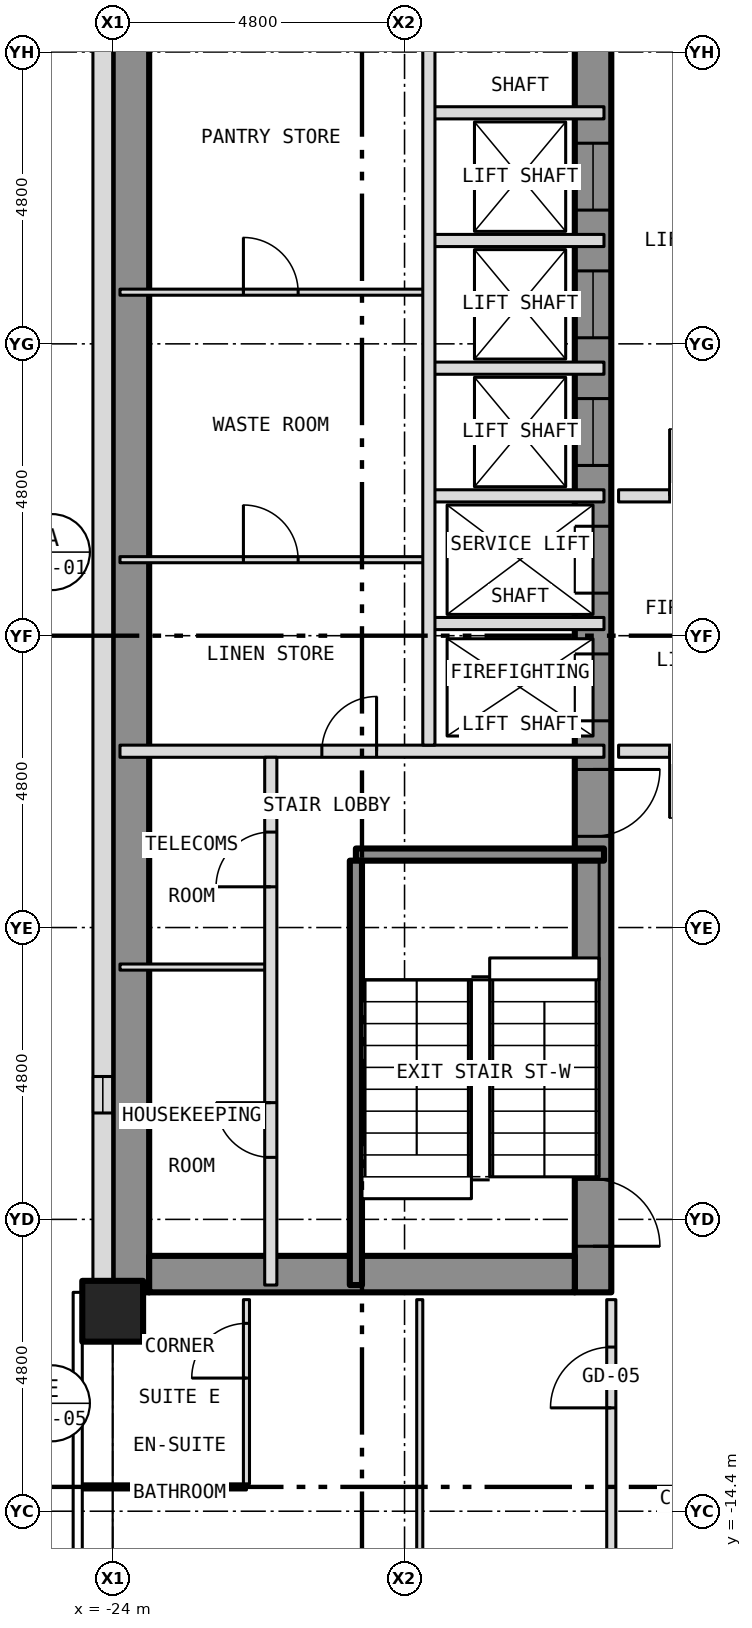
"""IFC4 building model, lengths in metres.
Left out: names, types, materials, properties, quantities, classifications, styles, units other than length and angle.
Written with IfcOpenShell. Run it as: python <this file> out.ifc"""

import sys

from ifc_helpers import new_model, si_unit, direction, frame, frame_2d, origin, origin_2d, place, context, subcontext, project, spatial, rectangle, hollow_rectangle, extrude, element, fill, save


model = new_model("IFC4")
c1 = context("Model", 3, precision=1e-05, world=origin(), true_north=direction((0.0, 1.0)))
c2 = subcontext(c1, "Body", "Model", "MODEL_VIEW")
j1 = project(units=[si_unit("LENGTHUNIT", "METRE"), si_unit("PLANEANGLEUNIT", "RADIAN")], contexts=[c1])
p1 = place(None, origin())
s1 = spatial("IfcSite", under=j1, at=p1, CompositionType="ELEMENT")
p2 = place(p1, origin())
s2 = spatial("IfcBuilding", under=s1, at=p2, CompositionType="ELEMENT")
p3 = place(p2, frame((0.0, 0.0, 70.5)))
s3 = spatial("IfcBuildingStorey", under=s2, at=p3, CompositionType="ELEMENT", Elevation=70.5)
p4 = place(p3, frame((-24.0, -11.111, -0.15), z_axis=(0.0, 0.0, 1.0), x_axis=(1.0, 0.0, 0.0)))
e1 = element("IfcColumn", 1, at=p4, inside=s3, PredefinedType="COLUMN", context=c2, shape_type="SweptSolid", body=[
    extrude(hollow_rectangle(XDim=1.0, YDim=1.0, WallThickness=0.06, at=origin_2d()), origin(), (0.0, 0.0, 1.0), 3.5),
])
p5 = place(p3, frame((-16.1, -10.8, 0.0), z_axis=(0.0, 0.0, 1.0), x_axis=(0.0, 1.0, 0.0)))
e2 = element("IfcWall", 2, at=p5, inside=s3, PredefinedType="SHEAR", context=c2, shape_type="SweptSolid", body=[
    extrude(rectangle(XDim=21.6, YDim=0.6, at=frame_2d((10.8, 0.0))), origin(), (0.0, 0.0, 1.0), 3.25),
])
p6 = place(p5, frame((9.4, 0.0, 0.0)))
e3 = element("IfcOpeningElement", 3, at=p6, cuts=e2, PredefinedType="OPENING", context=c2, shape_type="SweptSolid", body=[
    extrude(rectangle(XDim=1.1, YDim=2.1, at=frame_2d((0.55, 1.05))), frame((0.0, 0.312, 0.0), z_axis=(0.0, -1.0, 0.0), x_axis=(1.0, 0.0, 0.0)), (0.0, 0.0, 1.0), 0.624),
])
p7 = place(p5, frame((11.5, 0.0, 0.0)))
e4 = element("IfcOpeningElement", 4, at=p7, cuts=e2, PredefinedType="OPENING", context=c2, shape_type="SweptSolid", body=[
    extrude(rectangle(XDim=1.1, YDim=2.1, at=frame_2d((0.55, 1.05))), frame((0.0, 0.312, 0.0), z_axis=(0.0, -1.0, 0.0), x_axis=(1.0, 0.0, 0.0)), (0.0, 0.0, 1.0), 0.624),
])
p8 = place(p5, frame((13.6, 0.0, 0.0)))
e5 = element("IfcOpeningElement", 5, at=p8, cuts=e2, PredefinedType="OPENING", context=c2, shape_type="SweptSolid", body=[
    extrude(rectangle(XDim=1.1, YDim=2.1, at=frame_2d((0.55, 1.05))), frame((0.0, 0.312, 0.0), z_axis=(0.0, -1.0, 0.0), x_axis=(1.0, 0.0, 0.0)), (0.0, 0.0, 1.0), 0.624),
])
p9 = place(p5, frame((15.7, 0.0, 0.0)))
e6 = element("IfcOpeningElement", 6, at=p9, cuts=e2, PredefinedType="OPENING", context=c2, shape_type="SweptSolid", body=[
    extrude(rectangle(XDim=1.1, YDim=2.1, at=frame_2d((0.55, 1.05))), frame((0.0, 0.312, 0.0), z_axis=(0.0, -1.0, 0.0), x_axis=(1.0, 0.0, 0.0)), (0.0, 0.0, 1.0), 0.624),
])
p10 = place(p5, frame((17.8, 0.0, 0.0)))
e7 = element("IfcOpeningElement", 7, at=p10, cuts=e2, PredefinedType="OPENING", context=c2, shape_type="SweptSolid", body=[
    extrude(rectangle(XDim=1.1, YDim=2.1, at=frame_2d((0.55, 1.05))), frame((0.0, 0.312, 0.0), z_axis=(0.0, -1.0, 0.0), x_axis=(1.0, 0.0, 0.0)), (0.0, 0.0, 1.0), 0.624),
])
p11 = place(p5, frame((0.758, 0.0, 0.0)))
e8 = element("IfcOpeningElement", 8, at=p11, cuts=e2, PredefinedType="OPENING", context=c2, shape_type="SweptSolid", body=[
    extrude(rectangle(XDim=1.1, YDim=2.1, at=frame_2d((0.55, 1.05))), frame((0.0, 0.312, 0.0), z_axis=(0.0, -1.0, 0.0), x_axis=(1.0, 0.0, 0.0)), (0.0, 0.0, 1.0), 0.624),
])
p12 = place(p5, frame((7.5, 0.0, 0.0)))
e9 = element("IfcOpeningElement", 9, at=p12, cuts=e2, PredefinedType="OPENING", context=c2, shape_type="SweptSolid", body=[
    extrude(rectangle(XDim=1.1, YDim=2.1, at=frame_2d((0.55, 1.05))), frame((0.0, 0.312, 0.0), z_axis=(0.0, -1.0, 0.0), x_axis=(1.0, 0.0, 0.0)), (0.0, 0.0, 1.0), 0.624),
])
p13 = place(p3, frame((-23.7, -10.8, 0.0), z_axis=(0.0, 0.0, 1.0), x_axis=(0.0, 1.0, 0.0)))
e10 = element("IfcWall", 10, at=p13, inside=s3, PredefinedType="SHEAR", context=c2, shape_type="SweptSolid", body=[
    extrude(rectangle(XDim=21.6, YDim=0.6, at=frame_2d((10.8, 0.0))), origin(), (0.0, 0.0, 1.0), 3.25),
])
p14 = place(p3, frame((-23.4, -10.5, 0.0), z_axis=(0.0, 0.0, 1.0), x_axis=(1.0, 0.0, 0.0)))
e11 = element("IfcWall", 11, at=p14, inside=s3, PredefinedType="SHEAR", context=c2, shape_type="SweptSolid", body=[
    extrude(rectangle(XDim=7.0, YDim=0.6, at=frame_2d((3.5, 0.0))), origin(), (0.0, 0.0, 1.0), 3.25),
])
p15 = place(p3, frame((-24.163, 10.8, 0.0), z_axis=(0.0, 0.0, 1.0), x_axis=(0.0, -1.0, 0.0)))
e12 = element("IfcWall", 12, at=p15, inside=s3, PredefinedType="SOLIDWALL", context=c2, shape_type="SweptSolid", body=[
    extrude(rectangle(XDim=21.6, YDim=0.325, at=frame_2d((10.8, 0.0))), origin(), (0.0, 0.0, 1.0), 3.5),
])
p16 = place(p15, frame((18.05, 0.0, 1.0)))
e13 = element("IfcOpeningElement", 13, at=p16, cuts=e12, PredefinedType="OPENING", context=c2, shape_type="SweptSolid", body=[
    extrude(rectangle(XDim=0.6, YDim=1.5, at=frame_2d((0.3, 0.75))), frame((0.0, 0.175, 0.0), z_axis=(0.0, -1.0, 0.0), x_axis=(1.0, 0.0, 0.0)), (0.0, 0.0, 1.0), 0.349),
])
p17 = place(p3, frame((-24.53, -14.0, 0.0), z_axis=(0.0, 0.0, 1.0), x_axis=(1.0, 0.0, 0.0)))
e14 = element("IfcWall", 14, at=p17, inside=s3, PredefinedType="PARTITIONING", context=c2, shape_type="SweptSolid", body=[
    extrude(rectangle(XDim=2.73, YDim=0.1, at=frame_2d((1.365, 0.0))), origin(), (0.0, 0.0, 1.0), 3.35),
])
p18 = place(p3, frame((-23.88, -5.45, 0.0), z_axis=(0.0, 0.0, 1.0), x_axis=(1.0, 0.0, 0.0)))
e15 = element("IfcWall", 15, at=p18, inside=s3, PredefinedType="PARTITIONING", context=c2, shape_type="SweptSolid", body=[
    extrude(rectangle(XDim=2.48, YDim=0.1, at=frame_2d((1.24, 0.0))), origin(), (0.0, 0.0, 1.0), 3.25),
])
p19 = place(p3, frame((-20.0, -3.6, 0.0), z_axis=(0.0, 0.0, 1.0), x_axis=(1.0, 0.0, 0.0)))
e16 = element("IfcWall", 16, at=p19, inside=s3, PredefinedType="SHEAR", context=c2, shape_type="SweptSolid", body=[
    extrude(rectangle(XDim=4.08, YDim=0.2, at=frame_2d((2.04, 0.0))), origin(), (0.0, 0.0, 1.0), 3.25),
])
p20 = place(p3, frame((-23.88, -1.9, 0.0), z_axis=(0.0, 0.0, 1.0), x_axis=(1.0, 0.0, 0.0)))
e17 = element("IfcWall", 17, at=p20, inside=s3, PredefinedType="PARTITIONING", context=c2, shape_type="SweptSolid", body=[
    extrude(rectangle(XDim=7.96, YDim=0.2, at=frame_2d((3.98, 0.0))), origin(), (0.0, 0.0, 1.0), 3.25),
])
p21 = place(p20, frame((3.32, 0.0, 0.0)))
e18 = element("IfcOpeningElement", 18, at=p21, cuts=e17, PredefinedType="OPENING", context=c2, shape_type="SweptSolid", body=[
    extrude(rectangle(XDim=0.9, YDim=2.1, at=frame_2d((0.45, 1.05))), frame((0.0, 0.112, 0.0), z_axis=(0.0, -1.0, 0.0), x_axis=(1.0, 0.0, 0.0)), (0.0, 0.0, 1.0), 0.224),
])
p22 = place(p3, frame((-15.68, -1.9, 0.0), z_axis=(0.0, 0.0, 1.0), x_axis=(1.0, 0.0, 0.0)))
e19 = element("IfcWall", 19, at=p22, inside=s3, PredefinedType="PARTITIONING", context=c2, shape_type="SweptSolid", body=[
    extrude(rectangle(XDim=3.28, YDim=0.2, at=frame_2d((1.64, 0.0))), origin(), (0.0, 0.0, 1.0), 3.35),
])
p23 = place(p22, frame((0.84, 0.0, 0.0)))
e20 = element("IfcOpeningElement", 20, at=p23, cuts=e19, PredefinedType="OPENING", context=c2, shape_type="SweptSolid", body=[
    extrude(rectangle(XDim=1.1, YDim=2.1, at=frame_2d((0.55, 1.05))), frame((0.0, 0.112, 0.0), z_axis=(0.0, -1.0, 0.0), x_axis=(1.0, 0.0, 0.0)), (0.0, 0.0, 1.0), 0.224),
])
p24 = place(p3, frame((-18.8, 0.2, 0.0), z_axis=(0.0, 0.0, 1.0), x_axis=(1.0, 0.0, 0.0)))
e21 = element("IfcWall", 21, at=p24, inside=s3, PredefinedType="PARTITIONING", context=c2, shape_type="SweptSolid", body=[
    extrude(rectangle(XDim=2.88, YDim=0.2, at=frame_2d((1.44, 0.0))), origin(), (0.0, 0.0, 1.0), 3.25),
])
p25 = place(p3, frame((-23.88, 1.25, 0.0), z_axis=(0.0, 0.0, 1.0), x_axis=(1.0, 0.0, 0.0)))
e22 = element("IfcWall", 22, at=p25, inside=s3, PredefinedType="PARTITIONING", context=c2, shape_type="SweptSolid", body=[
    extrude(rectangle(XDim=5.08, YDim=0.1, at=frame_2d((2.54, 0.0))), origin(), (0.0, 0.0, 1.0), 3.25),
])
p26 = place(p25, frame((2.03, 0.0, 0.0)))
e23 = element("IfcOpeningElement", 23, at=p26, cuts=e22, PredefinedType="OPENING", context=c2, shape_type="SweptSolid", body=[
    extrude(rectangle(XDim=0.9, YDim=2.1, at=frame_2d((0.45, 1.05))), frame((0.0, 0.062, 0.0), z_axis=(0.0, -1.0, 0.0), x_axis=(1.0, 0.0, 0.0)), (0.0, 0.0, 1.0), 0.124),
])
p27 = place(p3, frame((-18.8, 2.3, 0.0), z_axis=(0.0, 0.0, 1.0), x_axis=(1.0, 0.0, 0.0)))
e24 = element("IfcWall", 24, at=p27, inside=s3, PredefinedType="PARTITIONING", context=c2, shape_type="SweptSolid", body=[
    extrude(rectangle(XDim=2.88, YDim=0.2, at=frame_2d((1.44, 0.0))), origin(), (0.0, 0.0, 1.0), 3.25),
])
p28 = place(p3, frame((-15.68, 2.3, 0.0), z_axis=(0.0, 0.0, 1.0), x_axis=(1.0, 0.0, 0.0)))
e25 = element("IfcWall", 25, at=p28, inside=s3, PredefinedType="PARTITIONING", context=c2, shape_type="SweptSolid", body=[
    extrude(rectangle(XDim=3.28, YDim=0.2, at=frame_2d((1.64, 0.0))), origin(), (0.0, 0.0, 1.0), 3.35),
])
p29 = place(p28, frame((0.84, 0.0, 0.0)))
e26 = element("IfcOpeningElement", 26, at=p29, cuts=e25, PredefinedType="OPENING", context=c2, shape_type="SweptSolid", body=[
    extrude(rectangle(XDim=1.1, YDim=2.1, at=frame_2d((0.55, 1.05))), frame((0.0, 0.112, 0.0), z_axis=(0.0, -1.0, 0.0), x_axis=(1.0, 0.0, 0.0)), (0.0, 0.0, 1.0), 0.224),
])
p30 = place(p3, frame((-18.8, 4.4, 0.0), z_axis=(0.0, 0.0, 1.0), x_axis=(1.0, 0.0, 0.0)))
e27 = element("IfcWall", 27, at=p30, inside=s3, PredefinedType="PARTITIONING", context=c2, shape_type="SweptSolid", body=[
    extrude(rectangle(XDim=2.88, YDim=0.2, at=frame_2d((1.44, 0.0))), origin(), (0.0, 0.0, 1.0), 3.25),
])
p31 = place(p3, frame((-23.88, 5.65, 0.0), z_axis=(0.0, 0.0, 1.0), x_axis=(1.0, 0.0, 0.0)))
e28 = element("IfcWall", 28, at=p31, inside=s3, PredefinedType="PARTITIONING", context=c2, shape_type="SweptSolid", body=[
    extrude(rectangle(XDim=5.08, YDim=0.1, at=frame_2d((2.54, 0.0))), origin(), (0.0, 0.0, 1.0), 3.25),
])
p32 = place(p31, frame((2.03, 0.0, 0.0)))
e29 = element("IfcOpeningElement", 29, at=p32, cuts=e28, PredefinedType="OPENING", context=c2, shape_type="SweptSolid", body=[
    extrude(rectangle(XDim=0.9, YDim=2.1, at=frame_2d((0.45, 1.05))), frame((0.0, 0.062, 0.0), z_axis=(0.0, -1.0, 0.0), x_axis=(1.0, 0.0, 0.0)), (0.0, 0.0, 1.0), 0.124),
])
for number, where, z_axis, x_axis in (
    (30, (-18.8, 6.5, 0.0), (0.0, 0.0, 1.0), (1.0, 0.0, 0.0)),
    (31, (-18.8, 8.6, 0.0), (0.0, 0.0, 1.0), (1.0, 0.0, 0.0)),
):
    element("IfcWall", number, at=place(p3, frame(where, z_axis=z_axis, x_axis=x_axis)), inside=s3, PredefinedType="PARTITIONING", context=c2, shape_type="SweptSolid", body=[
        extrude(rectangle(XDim=2.88, YDim=0.2, at=frame_2d((1.44, 0.0))), origin(), (0.0, 0.0, 1.0), 3.25),
    ])
p33 = place(p3, frame((-21.8, -13.95, 0.0), z_axis=(0.0, 0.0, 1.0), x_axis=(0.0, 1.0, 0.0)))
e32 = element("IfcWall", 32, at=p33, inside=s3, PredefinedType="PARTITIONING", context=c2, shape_type="SweptSolid", body=[
    extrude(rectangle(XDim=3.03, YDim=0.1, at=frame_2d((1.515, 0.0))), origin(), (0.0, 0.0, 1.0), 3.35),
])
p34 = place(p33, frame((1.74, 0.0, 0.0)))
e33 = element("IfcOpeningElement", 33, at=p34, cuts=e32, PredefinedType="OPENING", context=c2, shape_type="SweptSolid", body=[
    extrude(rectangle(XDim=0.9, YDim=2.1, at=frame_2d((0.45, 1.05))), frame((0.0, 0.062, 0.0), z_axis=(0.0, -1.0, 0.0), x_axis=(1.0, 0.0, 0.0)), (0.0, 0.0, 1.0), 0.124),
])
p35 = place(p3, frame((-21.4, -10.68, 0.0), z_axis=(0.0, 0.0, 1.0), x_axis=(0.0, 1.0, 0.0)))
e34 = element("IfcWall", 34, at=p35, inside=s3, PredefinedType="PARTITIONING", context=c2, shape_type="SweptSolid", body=[
    extrude(rectangle(XDim=8.68, YDim=0.2, at=frame_2d((4.34, 0.0))), origin(), (0.0, 0.0, 1.0), 3.25),
])
p36 = place(p35, frame((2.1, 0.0, 0.0)))
e35 = element("IfcOpeningElement", 35, at=p36, cuts=e34, PredefinedType="OPENING", context=c2, shape_type="SweptSolid", body=[
    extrude(rectangle(XDim=0.9, YDim=2.1, at=frame_2d((0.45, 1.05))), frame((0.0, 0.112, 0.0), z_axis=(0.0, -1.0, 0.0), x_axis=(1.0, 0.0, 0.0)), (0.0, 0.0, 1.0), 0.224),
])
p37 = place(p35, frame((6.55, 0.0, 0.0)))
e36 = element("IfcOpeningElement", 36, at=p37, cuts=e34, PredefinedType="OPENING", context=c2, shape_type="SweptSolid", body=[
    extrude(rectangle(XDim=0.9, YDim=2.1, at=frame_2d((0.45, 1.05))), frame((0.0, 0.112, 0.0), z_axis=(0.0, -1.0, 0.0), x_axis=(1.0, 0.0, 0.0)), (0.0, 0.0, 1.0), 0.224),
])
p38 = place(p3, frame((-20.0, -10.68, 0.0), z_axis=(0.0, 0.0, 1.0), x_axis=(0.0, 1.0, 0.0)))
e37 = element("IfcWall", 37, at=p38, inside=s3, PredefinedType="SHEAR", context=c2, shape_type="SweptSolid", body=[
    extrude(rectangle(XDim=6.98, YDim=0.2, at=frame_2d((3.49, 0.0))), origin(), (0.0, 0.0, 1.0), 3.25),
])
p39 = place(p3, frame((-18.95, -24.53, 0.0), z_axis=(0.0, 0.0, 1.0), x_axis=(0.0, 1.0, 0.0)))
e38 = element("IfcWall", 38, at=p39, inside=s3, PredefinedType="PARTITIONING", context=c2, shape_type="SweptSolid", body=[
    extrude(rectangle(XDim=13.61, YDim=0.1, at=frame_2d((6.805, 0.0))), origin(), (0.0, 0.0, 1.0), 3.35),
])
p40 = place(p39, frame((6.68, 0.0, 0.0)))
e39 = element("IfcOpeningElement", 39, at=p40, cuts=e38, PredefinedType="OPENING", context=c2, shape_type="SweptSolid", body=[
    extrude(rectangle(XDim=0.9, YDim=2.1, at=frame_2d((0.45, 1.05))), frame((0.0, 0.062, 0.0), z_axis=(0.0, -1.0, 0.0), x_axis=(1.0, 0.0, 0.0)), (0.0, 0.0, 1.0), 0.124),
])
p41 = place(p3, frame((-18.8, -1.8, 0.0), z_axis=(0.0, 0.0, 1.0), x_axis=(0.0, 1.0, 0.0)))
e40 = element("IfcWall", 40, at=p41, inside=s3, PredefinedType="PARTITIONING", context=c2, shape_type="SweptSolid", body=[
    extrude(rectangle(XDim=12.48, YDim=0.2, at=frame_2d((6.24, 0.0))), origin(), (0.0, 0.0, 1.0), 3.25),
])
p42 = place(p3, frame((-15.8, -15.725, 0.0), z_axis=(0.0, 0.0, 1.0), x_axis=(0.0, 1.0, 0.0)))
e41 = element("IfcWall", 41, at=p42, inside=s3, PredefinedType="PARTITIONING", context=c2, shape_type="SweptSolid", body=[
    extrude(rectangle(XDim=4.805, YDim=0.15, at=frame_2d((2.403, 0.0))), origin(), (0.0, 0.0, 1.0), 3.35),
])
p43 = place(p42, frame((3.025, 0.0, 0.0)))
e42 = element("IfcOpeningElement", 42, at=p43, cuts=e41, PredefinedType="OPENING", context=c2, shape_type="SweptSolid", body=[
    extrude(rectangle(XDim=1.0, YDim=2.1, at=frame_2d((0.5, 1.05))), frame((0.0, 0.087, 0.0), z_axis=(0.0, -1.0, 0.0), x_axis=(1.0, 0.0, 0.0)), (0.0, 0.0, 1.0), 0.174),
])
p44 = place(p16, origin())
e43 = element("IfcWindow", 43, at=p44, inside=s3, PartitioningType="SINGLE_PANEL", PredefinedType="WINDOW", context=c2, shape_type="SweptSolid", body=[
    extrude(rectangle(XDim=0.6, YDim=1.5, at=frame_2d((0.3, 0.75))), frame((0.0, -0.073, 0.0), z_axis=(0.0, -1.0, 0.0), x_axis=(1.0, 0.0, 0.0)), (0.0, 0.0, 1.0), 0.06),
])
fill(e13, e43)
p45 = place(p6, origin())
e44 = element("IfcDoor", 44, at=p45, inside=s3, OperationType="SLIDING_TO_LEFT", PredefinedType="DOOR", context=c2, shape_type="SweptSolid", body=[
    extrude(rectangle(XDim=1.1, YDim=2.1, at=frame_2d((0.55, 1.05))), frame((0.0, 0.025, 0.0), z_axis=(0.0, -1.0, 0.0), x_axis=(1.0, 0.0, 0.0)), (0.0, 0.0, 1.0), 0.05),
])
fill(e3, e44)
p46 = place(p7, origin())
e45 = element("IfcDoor", 45, at=p46, inside=s3, OperationType="SLIDING_TO_LEFT", PredefinedType="DOOR", context=c2, shape_type="SweptSolid", body=[
    extrude(rectangle(XDim=1.1, YDim=2.1, at=frame_2d((0.55, 1.05))), frame((0.0, 0.025, 0.0), z_axis=(0.0, -1.0, 0.0), x_axis=(1.0, 0.0, 0.0)), (0.0, 0.0, 1.0), 0.05),
])
fill(e4, e45)
p47 = place(p8, origin())
e46 = element("IfcDoor", 46, at=p47, inside=s3, OperationType="SLIDING_TO_LEFT", PredefinedType="DOOR", context=c2, shape_type="SweptSolid", body=[
    extrude(rectangle(XDim=1.1, YDim=2.1, at=frame_2d((0.55, 1.05))), frame((0.0, 0.025, 0.0), z_axis=(0.0, -1.0, 0.0), x_axis=(1.0, 0.0, 0.0)), (0.0, 0.0, 1.0), 0.05),
])
fill(e5, e46)
p48 = place(p9, origin())
e47 = element("IfcDoor", 47, at=p48, inside=s3, OperationType="SLIDING_TO_LEFT", PredefinedType="DOOR", context=c2, shape_type="SweptSolid", body=[
    extrude(rectangle(XDim=1.1, YDim=2.1, at=frame_2d((0.55, 1.05))), frame((0.0, 0.025, 0.0), z_axis=(0.0, -1.0, 0.0), x_axis=(1.0, 0.0, 0.0)), (0.0, 0.0, 1.0), 0.05),
])
fill(e6, e47)
p49 = place(p10, origin())
e48 = element("IfcDoor", 48, at=p49, inside=s3, OperationType="SLIDING_TO_LEFT", PredefinedType="DOOR", context=c2, shape_type="SweptSolid", body=[
    extrude(rectangle(XDim=1.1, YDim=2.1, at=frame_2d((0.55, 1.05))), frame((0.0, 0.025, 0.0), z_axis=(0.0, -1.0, 0.0), x_axis=(1.0, 0.0, 0.0)), (0.0, 0.0, 1.0), 0.05),
])
fill(e7, e48)
p50 = place(p11, origin())
e49 = element("IfcDoor", 49, at=p50, inside=s3, OperationType="SINGLE_SWING_LEFT", PredefinedType="DOOR", context=c2, shape_type="SweptSolid", body=[
    extrude(rectangle(XDim=1.1, YDim=2.1, at=frame_2d((0.55, 1.05))), frame((0.0, 0.025, 0.0), z_axis=(0.0, -1.0, 0.0), x_axis=(1.0, 0.0, 0.0)), (0.0, 0.0, 1.0), 0.05),
])
fill(e8, e49)
p51 = place(p12, origin())
e50 = element("IfcDoor", 50, at=p51, inside=s3, OperationType="SINGLE_SWING_RIGHT", PredefinedType="DOOR", context=c2, shape_type="SweptSolid", body=[
    extrude(rectangle(XDim=1.1, YDim=2.1, at=frame_2d((0.55, 1.05))), frame((0.0, 0.025, 0.0), z_axis=(0.0, -1.0, 0.0), x_axis=(1.0, 0.0, 0.0)), (0.0, 0.0, 1.0), 0.05),
])
fill(e9, e50)
p52 = place(p36, origin())
e51 = element("IfcDoor", 51, at=p52, inside=s3, OperationType="SINGLE_SWING_RIGHT", PredefinedType="DOOR", context=c2, shape_type="SweptSolid", body=[
    extrude(rectangle(XDim=0.9, YDim=2.1, at=frame_2d((0.45, 1.05))), frame((0.0, 0.025, 0.0), z_axis=(0.0, -1.0, 0.0), x_axis=(1.0, 0.0, 0.0)), (0.0, 0.0, 1.0), 0.05),
])
fill(e35, e51)
p53 = place(p37, origin())
e52 = element("IfcDoor", 52, at=p53, inside=s3, OperationType="SINGLE_SWING_LEFT", PredefinedType="DOOR", context=c2, shape_type="SweptSolid", body=[
    extrude(rectangle(XDim=0.9, YDim=2.1, at=frame_2d((0.45, 1.05))), frame((0.0, 0.025, 0.0), z_axis=(0.0, -1.0, 0.0), x_axis=(1.0, 0.0, 0.0)), (0.0, 0.0, 1.0), 0.05),
])
fill(e36, e52)
p54 = place(p21, origin())
e53 = element("IfcDoor", 53, at=p54, inside=s3, OperationType="SINGLE_SWING_RIGHT", PredefinedType="DOOR", context=c2, shape_type="SweptSolid", body=[
    extrude(rectangle(XDim=0.9, YDim=2.1, at=frame_2d((0.45, 1.05))), frame((0.0, 0.025, 0.0), z_axis=(0.0, -1.0, 0.0), x_axis=(1.0, 0.0, 0.0)), (0.0, 0.0, 1.0), 0.05),
])
fill(e18, e53)
p55 = place(p26, origin())
e54 = element("IfcDoor", 54, at=p55, inside=s3, OperationType="SINGLE_SWING_LEFT", PredefinedType="DOOR", context=c2, shape_type="SweptSolid", body=[
    extrude(rectangle(XDim=0.9, YDim=2.1, at=frame_2d((0.45, 1.05))), frame((0.0, 0.025, 0.0), z_axis=(0.0, -1.0, 0.0), x_axis=(1.0, 0.0, 0.0)), (0.0, 0.0, 1.0), 0.05),
])
fill(e23, e54)
p56 = place(p32, origin())
e55 = element("IfcDoor", 55, at=p56, inside=s3, OperationType="SINGLE_SWING_LEFT", PredefinedType="DOOR", context=c2, shape_type="SweptSolid", body=[
    extrude(rectangle(XDim=0.9, YDim=2.1, at=frame_2d((0.45, 1.05))), frame((0.0, 0.025, 0.0), z_axis=(0.0, -1.0, 0.0), x_axis=(1.0, 0.0, 0.0)), (0.0, 0.0, 1.0), 0.05),
])
fill(e29, e55)
p57 = place(p23, origin())
e56 = element("IfcDoor", 56, at=p57, inside=s3, OperationType="SINGLE_SWING_LEFT", PredefinedType="DOOR", context=c2, shape_type="SweptSolid", body=[
    extrude(rectangle(XDim=1.1, YDim=2.1, at=frame_2d((0.55, 1.05))), frame((0.0, 0.025, 0.0), z_axis=(0.0, -1.0, 0.0), x_axis=(1.0, 0.0, 0.0)), (0.0, 0.0, 1.0), 0.05),
])
fill(e20, e56)
p58 = place(p29, origin())
e57 = element("IfcDoor", 57, at=p58, inside=s3, OperationType="SINGLE_SWING_LEFT", PredefinedType="DOOR", context=c2, shape_type="SweptSolid", body=[
    extrude(rectangle(XDim=1.1, YDim=2.1, at=frame_2d((0.55, 1.05))), frame((0.0, 0.025, 0.0), z_axis=(0.0, -1.0, 0.0), x_axis=(1.0, 0.0, 0.0)), (0.0, 0.0, 1.0), 0.05),
])
fill(e26, e57)
p59 = place(p43, origin())
e58 = element("IfcDoor", 58, at=p59, inside=s3, OperationType="SINGLE_SWING_LEFT", PredefinedType="DOOR", context=c2, shape_type="SweptSolid", body=[
    extrude(rectangle(XDim=1.0, YDim=2.1, at=frame_2d((0.5, 1.05))), frame((0.0, 0.025, 0.0), z_axis=(0.0, -1.0, 0.0), x_axis=(1.0, 0.0, 0.0)), (0.0, 0.0, 1.0), 0.05),
])
fill(e42, e58)
p60 = place(p34, origin())
e59 = element("IfcDoor", 59, at=p60, inside=s3, OperationType="SINGLE_SWING_LEFT", PredefinedType="DOOR", context=c2, shape_type="SweptSolid", body=[
    extrude(rectangle(XDim=0.9, YDim=2.1, at=frame_2d((0.45, 1.05))), frame((0.0, 0.025, 0.0), z_axis=(0.0, -1.0, 0.0), x_axis=(1.0, 0.0, 0.0)), (0.0, 0.0, 1.0), 0.05),
])
fill(e33, e59)
save(model, sys.argv[1])
